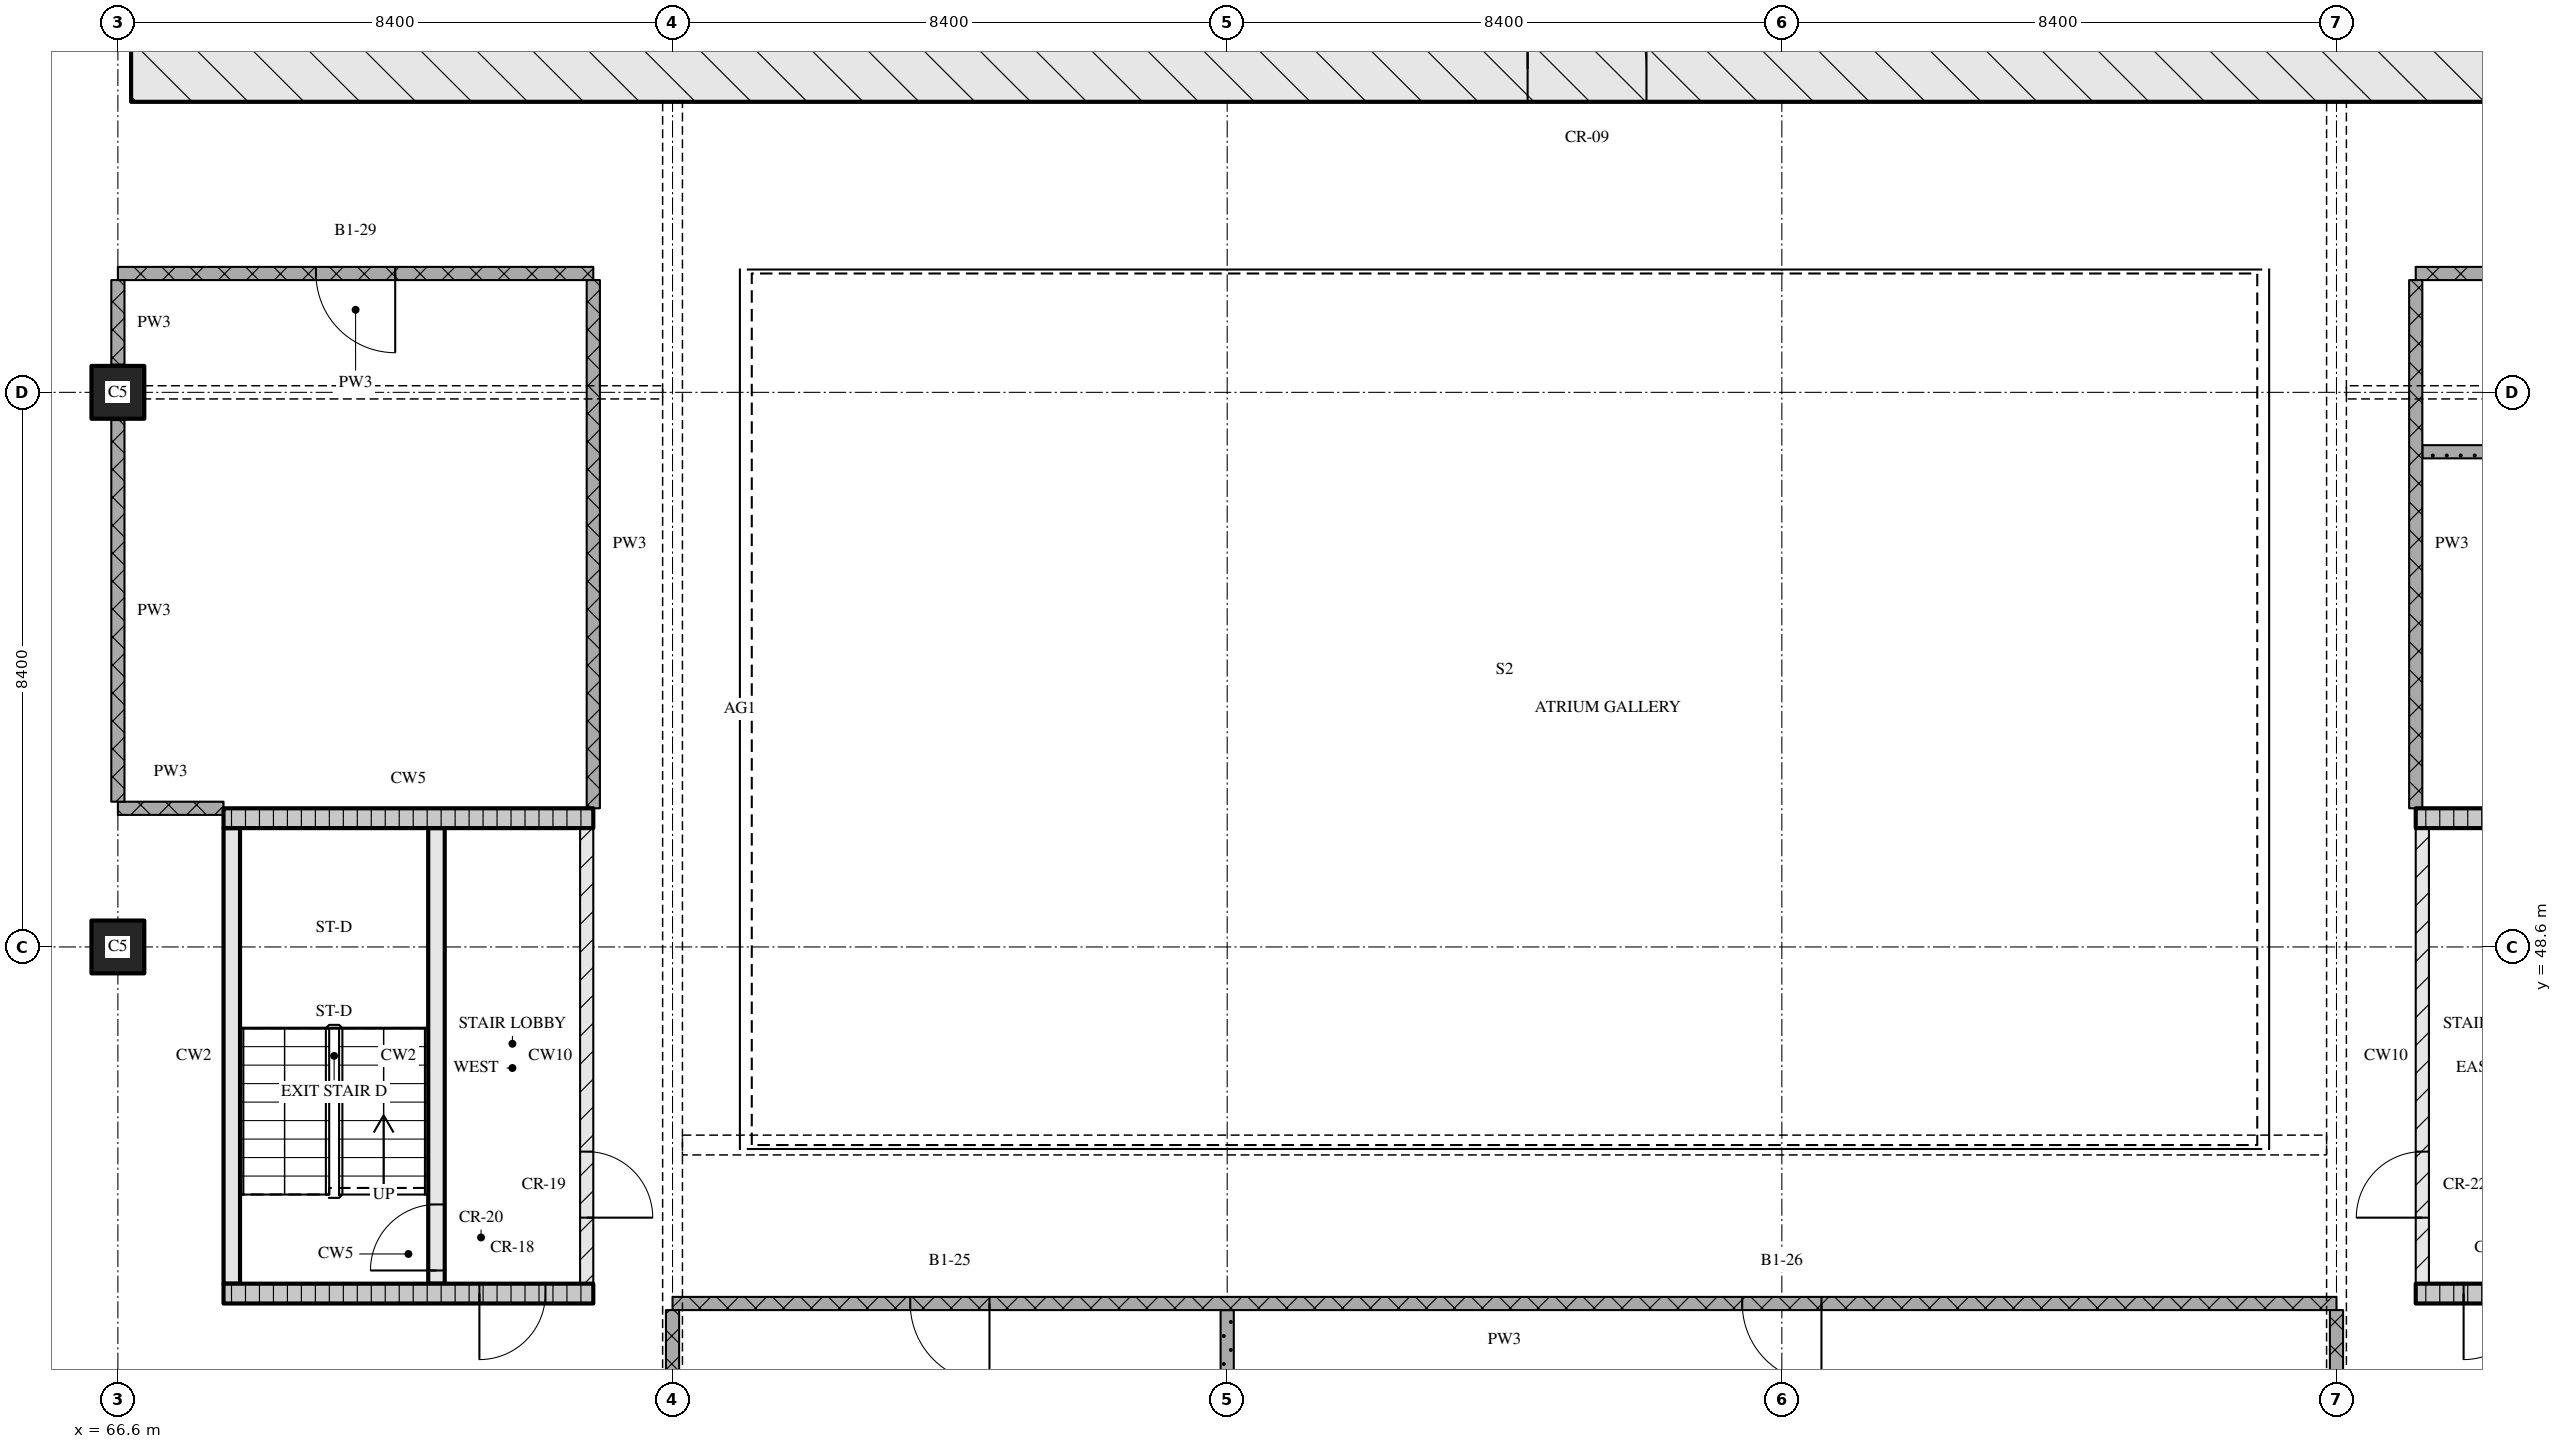
"""IFC4 building model, lengths in metres.
Left out: names, types, materials, properties, quantities, classifications, styles, units other than length and angle.
Written with IfcOpenShell. Run it as: python <this file> out.ifc"""

import sys

from ifc_helpers import new_model, si_unit, direction, frame, frame_2d, origin, origin_2d, place, context, subcontext, project, spatial, rectangle, extrude, element, fill, save


model = new_model("IFC4")
c1 = context("Model", 3, precision=1e-05, world=origin(), true_north=direction((0.0, 1.0)))
c2 = subcontext(c1, "Body", "Model", "MODEL_VIEW")
j1 = project(units=[si_unit("LENGTHUNIT", "METRE"), si_unit("PLANEANGLEUNIT", "RADIAN")], contexts=[c1])
p1 = place(None, origin())
s1 = spatial("IfcSite", under=j1, at=p1, CompositionType="ELEMENT")
p2 = place(p1, origin())
s2 = spatial("IfcBuilding", under=s1, at=p2, CompositionType="ELEMENT")
p3 = place(p2, frame((0.0, 0.0, 98.85)))
s3 = spatial("IfcBuildingStorey", under=s2, at=p3, CompositionType="ELEMENT", Elevation=98.85)
for number, where, z_axis, x_axis in (
    (1, (66.6, 48.6, 0.0), (0.0, 0.0, 1.0), (1.0, 0.0, 0.0)),
    (2, (66.6, 57.0, 0.0), (0.0, 0.0, 1.0), (1.0, 0.0, 0.0)),
):
    element("IfcColumn", number, at=place(p3, frame(where, z_axis=z_axis, x_axis=x_axis)), inside=s3, PredefinedType="COLUMN", context=c2, shape_type="SweptSolid", body=[
        extrude(rectangle(XDim=0.8, YDim=0.8, at=origin_2d()), origin(), (0.0, 0.0, 1.0), 3.6),
    ])
p4 = place(p3, frame((66.8, 61.9, 0.0), z_axis=(0.0, 0.0, 1.0), x_axis=(1.0, 0.0, 0.0)))
e3 = element("IfcWall", 3, at=p4, inside=s3, PredefinedType="SOLIDWALL", context=c2, shape_type="SweptSolid", body=[
    extrude(rectangle(XDim=41.6, YDim=1.0, at=frame_2d((20.8, 0.0))), origin(), (0.0, 0.0, 1.0), 3.32),
])
p5 = place(p4, frame((21.15, 0.0, 0.0)))
e4 = element("IfcOpeningElement", 4, at=p5, cuts=e3, PredefinedType="OPENING", context=c2, shape_type="SweptSolid", body=[
    extrude(rectangle(XDim=1.8, YDim=2.1, at=frame_2d((0.9, 1.05))), frame((0.0, 0.51, 0.0), z_axis=(0.0, -1.0, 0.0), x_axis=(1.0, 0.0, 0.0)), (0.0, 0.0, 1.0), 1.02),
])
p6 = place(p3, frame((68.2, 43.35, 0.0), z_axis=(0.0, 0.0, 1.0), x_axis=(1.0, 0.0, 0.0)))
e5 = element("IfcWall", 5, at=p6, inside=s3, PredefinedType="SOLIDWALL", context=c2, shape_type="SweptSolid", body=[
    extrude(rectangle(XDim=5.6, YDim=0.3, at=frame_2d((2.8, 0.0))), origin(), (0.0, 0.0, 1.0), 3.32),
])
p7 = place(p6, frame((3.875, 0.0, 0.0)))
e6 = element("IfcOpeningElement", 6, at=p7, cuts=e5, PredefinedType="OPENING", context=c2, shape_type="SweptSolid", body=[
    extrude(rectangle(XDim=1.0, YDim=2.1, at=frame_2d((0.5, 1.05))), frame((0.0, 0.16, 0.0), z_axis=(0.0, -1.0, 0.0), x_axis=(1.0, 0.0, 0.0)), (0.0, 0.0, 1.0), 0.32),
])
p8 = place(p3, frame((68.325, 43.5, 0.0), z_axis=(0.0, 0.0, 1.0), x_axis=(0.0, 1.0, 0.0)))
e7 = element("IfcWall", 7, at=p8, inside=s3, PredefinedType="SOLIDWALL", context=c2, shape_type="SweptSolid", body=[
    extrude(rectangle(XDim=6.9, YDim=0.25, at=frame_2d((3.45, 0.0))), origin(), (0.0, 0.0, 1.0), 3.32),
])
p9 = place(p3, frame((71.425, 43.5, 0.0), z_axis=(0.0, 0.0, 1.0), x_axis=(0.0, 1.0, 0.0)))
e8 = element("IfcWall", 8, at=p9, inside=s3, PredefinedType="SOLIDWALL", context=c2, shape_type="SweptSolid", body=[
    extrude(rectangle(XDim=6.9, YDim=0.25, at=frame_2d((3.45, 0.0))), origin(), (0.0, 0.0, 1.0), 3.32),
])
p10 = place(p9, frame((0.2, 0.0, 0.0)))
e9 = element("IfcOpeningElement", 9, at=p10, cuts=e8, PredefinedType="OPENING", context=c2, shape_type="SweptSolid", body=[
    extrude(rectangle(XDim=1.0, YDim=2.1, at=frame_2d((0.5, 1.05))), frame((0.0, 0.135, 0.0), z_axis=(0.0, -1.0, 0.0), x_axis=(1.0, 0.0, 0.0)), (0.0, 0.0, 1.0), 0.27),
])
p11 = place(p3, frame((73.7, 43.5, 0.0), z_axis=(0.0, 0.0, 1.0), x_axis=(0.0, 1.0, 0.0)))
e10 = element("IfcWall", 10, at=p11, inside=s3, PredefinedType="PARTITIONING", context=c2, shape_type="SweptSolid", body=[
    extrude(rectangle(XDim=6.9, YDim=0.2, at=frame_2d((3.45, 0.0))), origin(), (0.0, 0.0, 1.0), 3.32),
])
p12 = place(p11, frame((1.0, 0.0, 0.0)))
e11 = element("IfcOpeningElement", 11, at=p12, cuts=e10, PredefinedType="OPENING", context=c2, shape_type="SweptSolid", body=[
    extrude(rectangle(XDim=1.0, YDim=2.1, at=frame_2d((0.5, 1.05))), frame((0.0, 0.11, 0.0), z_axis=(0.0, -1.0, 0.0), x_axis=(1.0, 0.0, 0.0)), (0.0, 0.0, 1.0), 0.22),
])
p13 = place(p3, frame((68.2, 50.55, 0.0), z_axis=(0.0, 0.0, 1.0), x_axis=(1.0, 0.0, 0.0)))
e12 = element("IfcWall", 12, at=p13, inside=s3, PredefinedType="SOLIDWALL", context=c2, shape_type="SweptSolid", body=[
    extrude(rectangle(XDim=5.6, YDim=0.3, at=frame_2d((2.8, 0.0))), origin(), (0.0, 0.0, 1.0), 3.32),
])
p14 = place(p3, frame((101.4, 43.35, 0.0), z_axis=(0.0, 0.0, 1.0), x_axis=(1.0, 0.0, 0.0)))
e13 = element("IfcWall", 13, at=p14, inside=s3, PredefinedType="SOLIDWALL", context=c2, shape_type="SweptSolid", body=[
    extrude(rectangle(XDim=5.6, YDim=0.3, at=frame_2d((2.8, 0.0))), origin(), (0.0, 0.0, 1.0), 3.32),
])
p15 = place(p14, frame((0.725, 0.0, 0.0)))
e14 = element("IfcOpeningElement", 14, at=p15, cuts=e13, PredefinedType="OPENING", context=c2, shape_type="SweptSolid", body=[
    extrude(rectangle(XDim=1.0, YDim=2.1, at=frame_2d((0.5, 1.05))), frame((0.0, 0.16, 0.0), z_axis=(0.0, -1.0, 0.0), x_axis=(1.0, 0.0, 0.0)), (0.0, 0.0, 1.0), 0.32),
])
p16 = place(p3, frame((101.5, 43.5, 0.0), z_axis=(0.0, 0.0, 1.0), x_axis=(0.0, 1.0, 0.0)))
e15 = element("IfcWall", 15, at=p16, inside=s3, PredefinedType="PARTITIONING", context=c2, shape_type="SweptSolid", body=[
    extrude(rectangle(XDim=6.9, YDim=0.2, at=frame_2d((3.45, 0.0))), origin(), (0.0, 0.0, 1.0), 3.32),
])
p17 = place(p16, frame((1.0, 0.0, 0.0)))
e16 = element("IfcOpeningElement", 16, at=p17, cuts=e15, PredefinedType="OPENING", context=c2, shape_type="SweptSolid", body=[
    extrude(rectangle(XDim=1.0, YDim=2.1, at=frame_2d((0.5, 1.05))), frame((0.0, 0.11, 0.0), z_axis=(0.0, -1.0, 0.0), x_axis=(1.0, 0.0, 0.0)), (0.0, 0.0, 1.0), 0.22),
])
p18 = place(p3, frame((101.4, 50.55, 0.0), z_axis=(0.0, 0.0, 1.0), x_axis=(1.0, 0.0, 0.0)))
e17 = element("IfcWall", 17, at=p18, inside=s3, PredefinedType="SOLIDWALL", context=c2, shape_type="SweptSolid", body=[
    extrude(rectangle(XDim=5.6, YDim=0.3, at=frame_2d((2.8, 0.0))), origin(), (0.0, 0.0, 1.0), 3.32),
])
p19 = place(p3, frame((100.2, 43.2, 0.0), z_axis=(0.0, 0.0, 1.0), x_axis=(-1.0, 0.0, 0.0)))
e18 = element("IfcWall", 18, at=p19, inside=s3, PredefinedType="PARTITIONING", context=c2, shape_type="SweptSolid", body=[
    extrude(rectangle(XDim=25.2, YDim=0.2, at=frame_2d((12.6, 0.0))), origin(), (0.0, 0.0, 1.0), 3.32),
])
p20 = place(p19, frame((7.8, 0.0, 0.0)))
e19 = element("IfcOpeningElement", 19, at=p20, cuts=e18, PredefinedType="OPENING", context=c2, shape_type="SweptSolid", body=[
    extrude(rectangle(XDim=1.2, YDim=2.1, at=frame_2d((0.6, 1.05))), frame((0.0, 0.11, 0.0), z_axis=(0.0, -1.0, 0.0), x_axis=(1.0, 0.0, 0.0)), (0.0, 0.0, 1.0), 0.22),
])
p21 = place(p19, frame((20.4, 0.0, 0.0)))
e20 = element("IfcOpeningElement", 20, at=p21, cuts=e18, PredefinedType="OPENING", context=c2, shape_type="SweptSolid", body=[
    extrude(rectangle(XDim=1.2, YDim=2.1, at=frame_2d((0.6, 1.05))), frame((0.0, 0.11, 0.0), z_axis=(0.0, -1.0, 0.0), x_axis=(1.0, 0.0, 0.0)), (0.0, 0.0, 1.0), 0.22),
])
p22 = place(p3, frame((66.6, 50.7, 0.0), z_axis=(0.0, 0.0, 1.0), x_axis=(1.0, 0.0, 0.0)))
e21 = element("IfcWall", 21, at=p22, inside=s3, PredefinedType="PARTITIONING", context=c2, shape_type="SweptSolid", body=[
    extrude(rectangle(XDim=1.6, YDim=0.2, at=frame_2d((0.8, 0.0))), origin(), (0.0, 0.0, 1.0), 3.32),
])
p23 = place(p3, frame((101.5, 56.1, 0.0), z_axis=(0.0, 0.0, 1.0), x_axis=(1.0, 0.0, 0.0)))
e22 = element("IfcWall", 22, at=p23, inside=s3, PredefinedType="PARTITIONING", context=c2, shape_type="SweptSolid", body=[
    extrude(rectangle(XDim=7.0, YDim=0.2, at=frame_2d((3.5, 0.0))), origin(), (0.0, 0.0, 1.0), 3.32),
])
p24 = place(p3, frame((73.8, 58.8, 0.0), z_axis=(0.0, 0.0, 1.0), x_axis=(-1.0, 0.0, 0.0)))
e23 = element("IfcWall", 23, at=p24, inside=s3, PredefinedType="PARTITIONING", context=c2, shape_type="SweptSolid", body=[
    extrude(rectangle(XDim=7.2, YDim=0.2, at=frame_2d((3.6, 0.0))), origin(), (0.0, 0.0, 1.0), 3.32),
])
p25 = place(p24, frame((3.0, 0.0, 0.0)))
e24 = element("IfcOpeningElement", 24, at=p25, cuts=e23, PredefinedType="OPENING", context=c2, shape_type="SweptSolid", body=[
    extrude(rectangle(XDim=1.2, YDim=2.1, at=frame_2d((0.6, 1.05))), frame((0.0, 0.11, 0.0), z_axis=(0.0, -1.0, 0.0), x_axis=(1.0, 0.0, 0.0)), (0.0, 0.0, 1.0), 0.22),
])
p26 = place(p3, frame((101.4, 58.8, 0.0), z_axis=(0.0, 0.0, 1.0), x_axis=(1.0, 0.0, 0.0)))
e25 = element("IfcWall", 25, at=p26, inside=s3, PredefinedType="PARTITIONING", context=c2, shape_type="SweptSolid", body=[
    extrude(rectangle(XDim=7.2, YDim=0.2, at=frame_2d((3.6, 0.0))), origin(), (0.0, 0.0, 1.0), 3.32),
])
p27 = place(p3, frame((66.6, 56.58, 0.0), z_axis=(0.0, 0.0, 1.0), x_axis=(0.0, -1.0, 0.0)))
e26 = element("IfcWall", 26, at=p27, inside=s3, PredefinedType="PARTITIONING", context=c2, shape_type="SweptSolid", body=[
    extrude(rectangle(XDim=5.78, YDim=0.2, at=frame_2d((2.89, 0.0))), origin(), (0.0, 0.0, 1.0), 3.32),
])
p28 = place(p3, frame((66.6, 58.7, 0.0), z_axis=(0.0, 0.0, 1.0), x_axis=(0.0, -1.0, 0.0)))
e27 = element("IfcWall", 27, at=p28, inside=s3, PredefinedType="PARTITIONING", context=c2, shape_type="SweptSolid", body=[
    extrude(rectangle(XDim=1.28, YDim=0.2, at=frame_2d((0.64, 0.0))), origin(), (0.0, 0.0, 1.0), 3.32),
])
p29 = place(p3, frame((73.8, 58.7, 0.0), z_axis=(0.0, 0.0, 1.0), x_axis=(0.0, -1.0, 0.0)))
e28 = element("IfcWall", 28, at=p29, inside=s3, PredefinedType="PARTITIONING", context=c2, shape_type="SweptSolid", body=[
    extrude(rectangle(XDim=8.0, YDim=0.2, at=frame_2d((4.0, 0.0))), origin(), (0.0, 0.0, 1.0), 3.32),
])
p30 = place(p3, frame((75.0, 43.1, 0.0), z_axis=(0.0, 0.0, 1.0), x_axis=(0.0, -1.0, 0.0)))
e29 = element("IfcWall", 29, at=p30, inside=s3, PredefinedType="PARTITIONING", context=c2, shape_type="SweptSolid", body=[
    extrude(rectangle(XDim=2.2, YDim=0.2, at=frame_2d((1.1, 0.0))), origin(), (0.0, 0.0, 1.0), 2.43),
])
p31 = place(p3, frame((83.4, 43.1, 0.0), z_axis=(0.0, 0.0, 1.0), x_axis=(0.0, -1.0, 0.0)))
e30 = element("IfcWall", 30, at=p31, inside=s3, PredefinedType="PARTITIONING", context=c2, shape_type="SweptSolid", body=[
    extrude(rectangle(XDim=2.48, YDim=0.2, at=frame_2d((1.24, 0.0))), origin(), (0.0, 0.0, 1.0), 3.32),
])
p32 = place(p3, frame((100.2, 43.1, 0.0), z_axis=(0.0, 0.0, 1.0), x_axis=(0.0, -1.0, 0.0)))
e31 = element("IfcWall", 31, at=p32, inside=s3, PredefinedType="PARTITIONING", context=c2, shape_type="SweptSolid", body=[
    extrude(rectangle(XDim=2.2, YDim=0.2, at=frame_2d((1.1, 0.0))), origin(), (0.0, 0.0, 1.0), 2.43),
])
p33 = place(p3, frame((101.4, 58.7, 0.0), z_axis=(0.0, 0.0, 1.0), x_axis=(0.0, -1.0, 0.0)))
e32 = element("IfcWall", 32, at=p33, inside=s3, PredefinedType="PARTITIONING", context=c2, shape_type="SweptSolid", body=[
    extrude(rectangle(XDim=8.0, YDim=0.2, at=frame_2d((4.0, 0.0))), origin(), (0.0, 0.0, 1.0), 3.32),
])
p34 = place(p5, origin())
e33 = element("IfcDoor", 33, at=p34, inside=s3, OperationType="DOUBLE_DOOR_SINGLE_SWING", PredefinedType="DOOR", context=c2, shape_type="SweptSolid", body=[
    extrude(rectangle(XDim=1.8, YDim=2.1, at=frame_2d((0.9, 1.05))), frame((0.0, 0.025, 0.0), z_axis=(0.0, -1.0, 0.0), x_axis=(1.0, 0.0, 0.0)), (0.0, 0.0, 1.0), 0.05),
])
fill(e4, e33)
p35 = place(p7, origin())
e34 = element("IfcDoor", 34, at=p35, inside=s3, OperationType="SINGLE_SWING_RIGHT", PredefinedType="DOOR", context=c2, shape_type="SweptSolid", body=[
    extrude(rectangle(XDim=1.0, YDim=2.1, at=frame_2d((0.5, 1.05))), frame((0.0, 0.025, 0.0), z_axis=(0.0, -1.0, 0.0), x_axis=(1.0, 0.0, 0.0)), (0.0, 0.0, 1.0), 0.05),
])
fill(e6, e34)
p36 = place(p10, origin())
e35 = element("IfcDoor", 35, at=p36, inside=s3, OperationType="SINGLE_SWING_LEFT", PredefinedType="DOOR", context=c2, shape_type="SweptSolid", body=[
    extrude(rectangle(XDim=1.0, YDim=2.1, at=frame_2d((0.5, 1.05))), frame((0.0, 0.025, 0.0), z_axis=(0.0, -1.0, 0.0), x_axis=(1.0, 0.0, 0.0)), (0.0, 0.0, 1.0), 0.05),
])
fill(e9, e35)
p37 = place(p12, origin())
e36 = element("IfcDoor", 36, at=p37, inside=s3, OperationType="SINGLE_SWING_RIGHT", PredefinedType="DOOR", context=c2, shape_type="SweptSolid", body=[
    extrude(rectangle(XDim=1.0, YDim=2.1, at=frame_2d((0.5, 1.05))), frame((0.0, 0.025, 0.0), z_axis=(0.0, -1.0, 0.0), x_axis=(1.0, 0.0, 0.0)), (0.0, 0.0, 1.0), 0.05),
])
fill(e11, e36)
p38 = place(p15, origin())
e37 = element("IfcDoor", 37, at=p38, inside=s3, OperationType="SINGLE_SWING_RIGHT", PredefinedType="DOOR", context=c2, shape_type="SweptSolid", body=[
    extrude(rectangle(XDim=1.0, YDim=2.1, at=frame_2d((0.5, 1.05))), frame((0.0, 0.025, 0.0), z_axis=(0.0, -1.0, 0.0), x_axis=(1.0, 0.0, 0.0)), (0.0, 0.0, 1.0), 0.05),
])
fill(e14, e37)
p39 = place(p17, origin())
e38 = element("IfcDoor", 38, at=p39, inside=s3, OperationType="SINGLE_SWING_LEFT", PredefinedType="DOOR", context=c2, shape_type="SweptSolid", body=[
    extrude(rectangle(XDim=1.0, YDim=2.1, at=frame_2d((0.5, 1.05))), frame((0.0, 0.025, 0.0), z_axis=(0.0, -1.0, 0.0), x_axis=(1.0, 0.0, 0.0)), (0.0, 0.0, 1.0), 0.05),
])
fill(e16, e38)
p40 = place(p20, origin())
e39 = element("IfcDoor", 39, at=p40, inside=s3, OperationType="SINGLE_SWING_LEFT", PredefinedType="DOOR", context=c2, shape_type="SweptSolid", body=[
    extrude(rectangle(XDim=1.2, YDim=2.1, at=frame_2d((0.6, 1.05))), frame((0.0, 0.025, 0.0), z_axis=(0.0, -1.0, 0.0), x_axis=(1.0, 0.0, 0.0)), (0.0, 0.0, 1.0), 0.05),
])
fill(e19, e39)
p41 = place(p21, origin())
e40 = element("IfcDoor", 40, at=p41, inside=s3, OperationType="SINGLE_SWING_LEFT", PredefinedType="DOOR", context=c2, shape_type="SweptSolid", body=[
    extrude(rectangle(XDim=1.2, YDim=2.1, at=frame_2d((0.6, 1.05))), frame((0.0, 0.025, 0.0), z_axis=(0.0, -1.0, 0.0), x_axis=(1.0, 0.0, 0.0)), (0.0, 0.0, 1.0), 0.05),
])
fill(e20, e40)
p42 = place(p25, origin())
e41 = element("IfcDoor", 41, at=p42, inside=s3, OperationType="SINGLE_SWING_LEFT", PredefinedType="DOOR", context=c2, shape_type="SweptSolid", body=[
    extrude(rectangle(XDim=1.2, YDim=2.1, at=frame_2d((0.6, 1.05))), frame((0.0, 0.025, 0.0), z_axis=(0.0, -1.0, 0.0), x_axis=(1.0, 0.0, 0.0)), (0.0, 0.0, 1.0), 0.05),
])
fill(e24, e41)
save(model, sys.argv[1])
